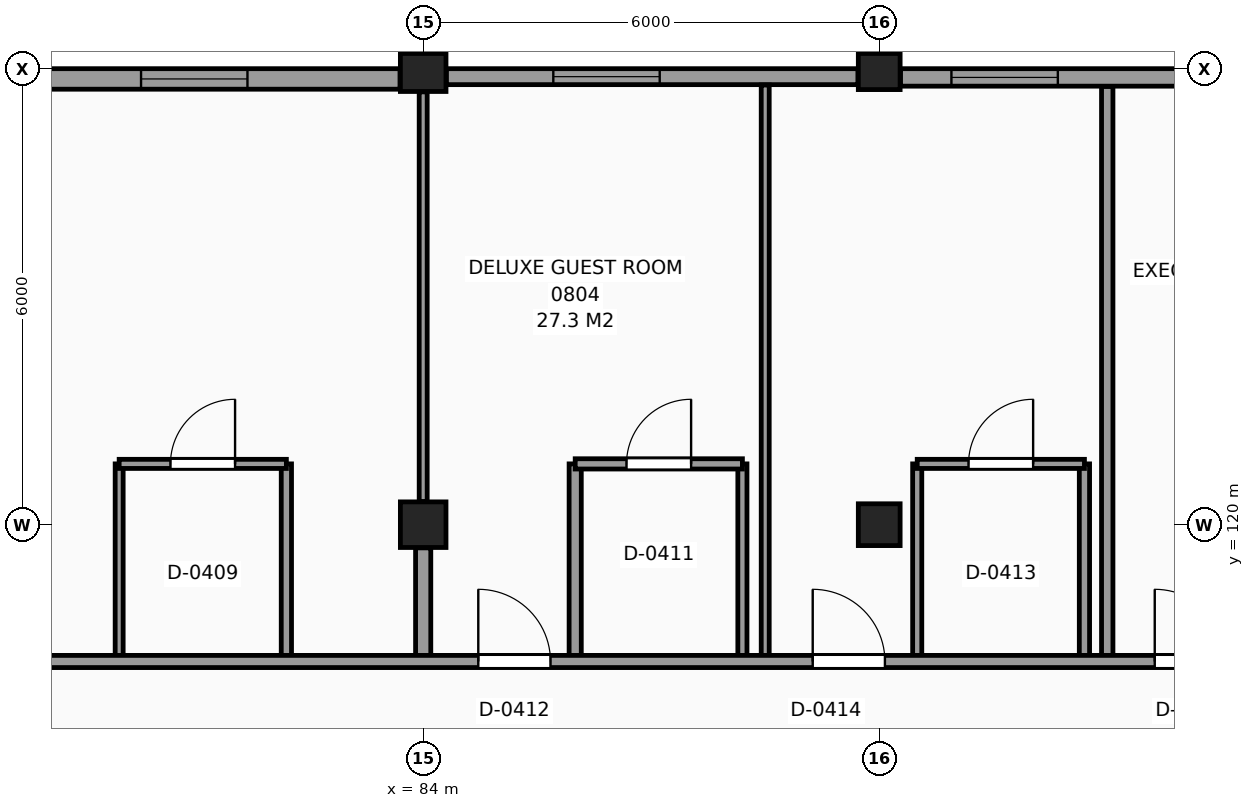
"""IFC4 building model, lengths in metres.
Left out: names, types, materials, properties, quantities, classifications, styles, units other than length and angle.
Written with IfcOpenShell. Run it as: python <this file> out.ifc"""

import sys

from ifc_helpers import new_model, si_unit, direction, frame, frame_2d, origin, origin_2d, place, context, subcontext, project, spatial, rectangle, extrude, element, fill, save


model = new_model("IFC4")
c1 = context("Model", 3, precision=1e-05, world=origin(), true_north=direction((0.0, 1.0)))
c2 = subcontext(c1, "Body", "Model", "MODEL_VIEW")
j1 = project(units=[si_unit("LENGTHUNIT", "METRE"), si_unit("PLANEANGLEUNIT", "RADIAN")], contexts=[c1])
p1 = place(None, origin())
s1 = spatial("IfcSite", under=j1, at=p1, CompositionType="ELEMENT")
p2 = place(p1, origin())
s2 = spatial("IfcBuilding", under=s1, at=p2, CompositionType="ELEMENT")
p3 = place(p2, frame((0.0, 0.0, 34.8)))
s3 = spatial("IfcBuildingStorey", under=s2, at=p3, CompositionType="ELEMENT", Elevation=34.8)
for number, where, z_axis, x_axis in (
    (1, (84.0, 120.0, 0.0), (0.0, 0.0, 1.0), (1.0, 0.0, 0.0)),
    (2, (84.0, 126.0, 0.0), (0.0, 0.0, 1.0), (1.0, 0.0, 0.0)),
):
    element("IfcColumn", number, at=place(p3, frame(where, z_axis=z_axis, x_axis=x_axis)), inside=s3, PredefinedType="COLUMN", context=c2, shape_type="SweptSolid", body=[
        extrude(rectangle(XDim=0.6, YDim=0.6, at=origin_2d()), origin(), (0.0, 0.0, 1.0), 3.3),
    ])
for number, where, z_axis, x_axis in (
    (3, (90.0, 120.0, 0.0), (0.0, 0.0, 1.0), (1.0, 0.0, 0.0)),
    (4, (90.0, 126.0, 0.0), (0.0, 0.0, 1.0), (1.0, 0.0, 0.0)),
):
    element("IfcColumn", number, at=place(p3, frame(where, z_axis=z_axis, x_axis=x_axis)), inside=s3, PredefinedType="COLUMN", context=c2, shape_type="SweptSolid", body=[
        extrude(rectangle(XDim=0.55, YDim=0.55, at=origin_2d()), origin(), (0.0, 0.0, 1.0), 3.3),
    ])
p4 = place(p3, frame((95.695, 125.885, 0.0), z_axis=(0.0, 0.0, 1.0), x_axis=(-1.0, 0.0, 0.0)))
e5 = element("IfcWall", 5, at=p4, inside=s3, PredefinedType="SOLIDWALL", context=c2, shape_type="SweptSolid", body=[
    extrude(rectangle(XDim=5.415, YDim=0.23, at=frame_2d((2.708, 0.0))), origin(), (0.0, 0.0, 1.0), 2.445),
])
p5 = place(p4, frame((3.345, 0.0, 0.8)))
e6 = element("IfcOpeningElement", 6, at=p5, cuts=e5, PredefinedType="OPENING", context=c2, shape_type="SweptSolid", body=[
    extrude(rectangle(XDim=1.4, YDim=1.4, at=frame_2d((0.7, 0.7))), frame((0.0, 0.125, 0.0), z_axis=(0.0, -1.0, 0.0), x_axis=(1.0, 0.0, 0.0)), (0.0, 0.0, 1.0), 0.25),
])
p6 = place(p3, frame((89.72, 125.895, 0.0), z_axis=(0.0, 0.0, 1.0), x_axis=(-1.0, 0.0, 0.0)))
e7 = element("IfcWall", 7, at=p6, inside=s3, PredefinedType="SOLIDWALL", context=c2, shape_type="SweptSolid", body=[
    extrude(rectangle(XDim=5.415, YDim=0.21, at=frame_2d((2.708, 0.0))), origin(), (0.0, 0.0, 1.0), 2.445),
])
p7 = place(p6, frame((2.608, 0.0, 0.8)))
e8 = element("IfcOpeningElement", 8, at=p7, cuts=e7, PredefinedType="OPENING", context=c2, shape_type="SweptSolid", body=[
    extrude(rectangle(XDim=1.4, YDim=1.4, at=frame_2d((0.7, 0.7))), frame((0.0, 0.115, 0.0), z_axis=(0.0, -1.0, 0.0), x_axis=(1.0, 0.0, 0.0)), (0.0, 0.0, 1.0), 0.23),
])
p8 = place(p3, frame((83.695, 125.865, 0.0), z_axis=(0.0, 0.0, 1.0), x_axis=(-1.0, 0.0, 0.0)))
e9 = element("IfcWall", 9, at=p8, inside=s3, PredefinedType="SOLIDWALL", context=c2, shape_type="SweptSolid", body=[
    extrude(rectangle(XDim=5.415, YDim=0.27, at=frame_2d((2.708, 0.0))), origin(), (0.0, 0.0, 1.0), 2.445),
])
p9 = place(p8, frame((2.007, 0.0, 0.8)))
e10 = element("IfcOpeningElement", 10, at=p9, cuts=e9, PredefinedType="OPENING", context=c2, shape_type="SweptSolid", body=[
    extrude(rectangle(XDim=1.4, YDim=1.4, at=frame_2d((0.7, 0.7))), frame((0.0, 0.145, 0.0), z_axis=(0.0, -1.0, 0.0), x_axis=(1.0, 0.0, 0.0)), (0.0, 0.0, 1.0), 0.29),
])
p10 = place(p3, frame((80.0, 118.2, 0.0), z_axis=(0.0, 0.0, 1.0), x_axis=(0.0, 1.0, 0.0)))
e11 = element("IfcWall", 11, at=p10, inside=s3, PredefinedType="PARTITIONING", context=c2, shape_type="SweptSolid", body=[
    extrude(rectangle(XDim=2.6, YDim=0.105, at=frame_2d((1.3, 0.0))), origin(), (0.0, 0.0, 1.0), 3.07),
])
p11 = place(p3, frame((82.2, 118.2, 0.0), z_axis=(0.0, 0.0, 1.0), x_axis=(0.0, 1.0, 0.0)))
e12 = element("IfcWall", 12, at=p11, inside=s3, PredefinedType="PARTITIONING", context=c2, shape_type="SweptSolid", body=[
    extrude(rectangle(XDim=2.6, YDim=0.135, at=frame_2d((1.3, 0.0))), origin(), (0.0, 0.0, 1.0), 3.07),
])
p12 = place(p3, frame((84.0, 118.2, 0.0), z_axis=(0.0, 0.0, 1.0), x_axis=(0.0, 1.0, 0.0)))
e13 = element("IfcWall", 13, at=p12, inside=s3, PredefinedType="PARTITIONING", context=c2, shape_type="SweptSolid", body=[
    extrude(rectangle(XDim=1.495, YDim=0.2, at=frame_2d((0.748, 0.0))), origin(), (0.0, 0.0, 1.0), 2.295),
])
p13 = place(p3, frame((84.0, 120.305, 0.0), z_axis=(0.0, 0.0, 1.0), x_axis=(0.0, 1.0, 0.0)))
e14 = element("IfcWall", 14, at=p13, inside=s3, PredefinedType="PARTITIONING", context=c2, shape_type="SweptSolid", body=[
    extrude(rectangle(XDim=5.39, YDim=0.105, at=frame_2d((2.695, 0.0))), origin(), (0.0, 0.0, 1.0), 2.295),
])
p14 = place(p3, frame((86.0, 118.2, 0.0), z_axis=(0.0, 0.0, 1.0), x_axis=(0.0, 1.0, 0.0)))
e15 = element("IfcWall", 15, at=p14, inside=s3, PredefinedType="PARTITIONING", context=c2, shape_type="SweptSolid", body=[
    extrude(rectangle(XDim=2.6, YDim=0.16, at=frame_2d((1.3, 0.0))), origin(), (0.0, 0.0, 1.0), 3.07),
])
p15 = place(p3, frame((88.2, 118.2, 0.0), z_axis=(0.0, 0.0, 1.0), x_axis=(0.0, 1.0, 0.0)))
e16 = element("IfcWall", 16, at=p15, inside=s3, PredefinedType="PARTITIONING", context=c2, shape_type="SweptSolid", body=[
    extrude(rectangle(XDim=2.6, YDim=0.12, at=frame_2d((1.3, 0.0))), origin(), (0.0, 0.0, 1.0), 3.07),
])
p16 = place(p3, frame((88.5, 118.2, 0.0), z_axis=(0.0, 0.0, 1.0), x_axis=(0.0, 1.0, 0.0)))
e17 = element("IfcWall", 17, at=p16, inside=s3, PredefinedType="PARTITIONING", context=c2, shape_type="SweptSolid", body=[
    extrude(rectangle(XDim=7.585, YDim=0.105, at=frame_2d((3.792, 0.0))), origin(), (0.0, 0.0, 1.0), 3.07),
])
p17 = place(p3, frame((90.5, 118.2, 0.0), z_axis=(0.0, 0.0, 1.0), x_axis=(0.0, 1.0, 0.0)))
e18 = element("IfcWall", 18, at=p17, inside=s3, PredefinedType="PARTITIONING", context=c2, shape_type="SweptSolid", body=[
    extrude(rectangle(XDim=2.6, YDim=0.12, at=frame_2d((1.3, 0.0))), origin(), (0.0, 0.0, 1.0), 3.07),
])
p18 = place(p3, frame((92.7, 118.2, 0.0), z_axis=(0.0, 0.0, 1.0), x_axis=(0.0, 1.0, 0.0)))
e19 = element("IfcWall", 19, at=p18, inside=s3, PredefinedType="PARTITIONING", context=c2, shape_type="SweptSolid", body=[
    extrude(rectangle(XDim=2.6, YDim=0.135, at=frame_2d((1.3, 0.0))), origin(), (0.0, 0.0, 1.0), 3.07),
])
p19 = place(p3, frame((93.0, 118.2, 0.0), z_axis=(0.0, 0.0, 1.0), x_axis=(0.0, 1.0, 0.0)))
e20 = element("IfcWall", 20, at=p19, inside=s3, PredefinedType="PARTITIONING", context=c2, shape_type="SweptSolid", body=[
    extrude(rectangle(XDim=7.565, YDim=0.15, at=frame_2d((3.782, 0.0))), origin(), (0.0, 0.0, 1.0), 3.07),
])
p20 = place(p3, frame((66.275, 118.2, 0.0), z_axis=(0.0, 0.0, 1.0), x_axis=(1.0, 0.0, 0.0)))
e21 = element("IfcWall", 21, at=p20, inside=s3, PredefinedType="PARTITIONING", context=c2, shape_type="SweptSolid", body=[
    extrude(rectangle(XDim=110.225, YDim=0.16, at=frame_2d((55.113, 0.0))), origin(), (0.0, 0.0, 1.0), 3.07),
])
p21 = place(p20, frame((0.45, 0.0, 0.0)))
e22 = element("IfcOpeningElement", 22, at=p21, cuts=e21, PredefinedType="OPENING", context=c2, shape_type="SweptSolid", body=[
    extrude(rectangle(XDim=0.95, YDim=2.1, at=frame_2d((0.475, 1.05))), frame((0.0, 0.09, 0.0), z_axis=(0.0, -1.0, 0.0), x_axis=(1.0, 0.0, 0.0)), (0.0, 0.0, 1.0), 0.18),
])
p22 = place(p20, frame((4.85, 0.0, 0.0)))
e23 = element("IfcOpeningElement", 23, at=p22, cuts=e21, PredefinedType="OPENING", context=c2, shape_type="SweptSolid", body=[
    extrude(rectangle(XDim=0.95, YDim=2.1, at=frame_2d((0.475, 1.05))), frame((0.0, 0.09, 0.0), z_axis=(0.0, -1.0, 0.0), x_axis=(1.0, 0.0, 0.0)), (0.0, 0.0, 1.0), 0.18),
])
p23 = place(p20, frame((9.35, 0.0, 0.0)))
e24 = element("IfcOpeningElement", 24, at=p23, cuts=e21, PredefinedType="OPENING", context=c2, shape_type="SweptSolid", body=[
    extrude(rectangle(XDim=0.95, YDim=2.1, at=frame_2d((0.475, 1.05))), frame((0.0, 0.09, 0.0), z_axis=(0.0, -1.0, 0.0), x_axis=(1.0, 0.0, 0.0)), (0.0, 0.0, 1.0), 0.18),
])
p24 = place(p20, frame((18.45, 0.0, 0.0)))
e25 = element("IfcOpeningElement", 25, at=p24, cuts=e21, PredefinedType="OPENING", context=c2, shape_type="SweptSolid", body=[
    extrude(rectangle(XDim=0.95, YDim=2.1, at=frame_2d((0.475, 1.05))), frame((0.0, 0.09, 0.0), z_axis=(0.0, -1.0, 0.0), x_axis=(1.0, 0.0, 0.0)), (0.0, 0.0, 1.0), 0.18),
])
p25 = place(p20, frame((22.85, 0.0, 0.0)))
e26 = element("IfcOpeningElement", 26, at=p25, cuts=e21, PredefinedType="OPENING", context=c2, shape_type="SweptSolid", body=[
    extrude(rectangle(XDim=0.95, YDim=2.1, at=frame_2d((0.475, 1.05))), frame((0.0, 0.09, 0.0), z_axis=(0.0, -1.0, 0.0), x_axis=(1.0, 0.0, 0.0)), (0.0, 0.0, 1.0), 0.18),
])
p26 = place(p20, frame((27.35, 0.0, 0.0)))
e27 = element("IfcOpeningElement", 27, at=p26, cuts=e21, PredefinedType="OPENING", context=c2, shape_type="SweptSolid", body=[
    extrude(rectangle(XDim=0.95, YDim=2.1, at=frame_2d((0.475, 1.05))), frame((0.0, 0.09, 0.0), z_axis=(0.0, -1.0, 0.0), x_axis=(1.0, 0.0, 0.0)), (0.0, 0.0, 1.0), 0.18),
])
p27 = place(p20, frame((42.05, 0.0, 0.0)))
e28 = element("IfcOpeningElement", 28, at=p27, cuts=e21, PredefinedType="OPENING", context=c2, shape_type="SweptSolid", body=[
    extrude(rectangle(XDim=0.95, YDim=2.1, at=frame_2d((0.475, 1.05))), frame((0.0, 0.09, 0.0), z_axis=(0.0, -1.0, 0.0), x_axis=(1.0, 0.0, 0.0)), (0.0, 0.0, 1.0), 0.18),
])
p28 = place(p20, frame((50.3, 0.0, 0.0)))
e29 = element("IfcOpeningElement", 29, at=p28, cuts=e21, PredefinedType="OPENING", context=c2, shape_type="SweptSolid", body=[
    extrude(rectangle(XDim=0.95, YDim=2.1, at=frame_2d((0.475, 1.05))), frame((0.0, 0.09, 0.0), z_axis=(0.0, -1.0, 0.0), x_axis=(1.0, 0.0, 0.0)), (0.0, 0.0, 1.0), 0.18),
])
p29 = place(p20, frame((52.85, 0.0, 0.0)))
e30 = element("IfcOpeningElement", 30, at=p29, cuts=e21, PredefinedType="OPENING", context=c2, shape_type="SweptSolid", body=[
    extrude(rectangle(XDim=0.95, YDim=2.1, at=frame_2d((0.475, 1.05))), frame((0.0, 0.09, 0.0), z_axis=(0.0, -1.0, 0.0), x_axis=(1.0, 0.0, 0.0)), (0.0, 0.0, 1.0), 0.18),
])
p30 = place(p20, frame((60.05, 0.0, 0.0)))
e31 = element("IfcOpeningElement", 31, at=p30, cuts=e21, PredefinedType="OPENING", context=c2, shape_type="SweptSolid", body=[
    extrude(rectangle(XDim=0.95, YDim=2.1, at=frame_2d((0.475, 1.05))), frame((0.0, 0.09, 0.0), z_axis=(0.0, -1.0, 0.0), x_axis=(1.0, 0.0, 0.0)), (0.0, 0.0, 1.0), 0.18),
])
p31 = place(p20, frame((64.25, 0.0, 0.0)))
e32 = element("IfcOpeningElement", 32, at=p31, cuts=e21, PredefinedType="OPENING", context=c2, shape_type="SweptSolid", body=[
    extrude(rectangle(XDim=0.95, YDim=2.1, at=frame_2d((0.475, 1.05))), frame((0.0, 0.09, 0.0), z_axis=(0.0, -1.0, 0.0), x_axis=(1.0, 0.0, 0.0)), (0.0, 0.0, 1.0), 0.18),
])
p32 = place(p20, frame((66.45, 0.0, 0.0)))
e33 = element("IfcOpeningElement", 33, at=p32, cuts=e21, PredefinedType="OPENING", context=c2, shape_type="SweptSolid", body=[
    extrude(rectangle(XDim=0.95, YDim=2.1, at=frame_2d((0.475, 1.05))), frame((0.0, 0.09, 0.0), z_axis=(0.0, -1.0, 0.0), x_axis=(1.0, 0.0, 0.0)), (0.0, 0.0, 1.0), 0.18),
])
p33 = place(p20, frame((72.45, 0.0, 0.0)))
e34 = element("IfcOpeningElement", 34, at=p33, cuts=e21, PredefinedType="OPENING", context=c2, shape_type="SweptSolid", body=[
    extrude(rectangle(XDim=0.95, YDim=2.1, at=frame_2d((0.475, 1.05))), frame((0.0, 0.09, 0.0), z_axis=(0.0, -1.0, 0.0), x_axis=(1.0, 0.0, 0.0)), (0.0, 0.0, 1.0), 0.18),
])
p34 = place(p20, frame((82.25, 0.0, 0.0)))
e35 = element("IfcOpeningElement", 35, at=p34, cuts=e21, PredefinedType="OPENING", context=c2, shape_type="SweptSolid", body=[
    extrude(rectangle(XDim=0.95, YDim=2.1, at=frame_2d((0.475, 1.05))), frame((0.0, 0.09, 0.0), z_axis=(0.0, -1.0, 0.0), x_axis=(1.0, 0.0, 0.0)), (0.0, 0.0, 1.0), 0.18),
])
p35 = place(p20, frame((84.45, 0.0, 0.0)))
e36 = element("IfcOpeningElement", 36, at=p35, cuts=e21, PredefinedType="OPENING", context=c2, shape_type="SweptSolid", body=[
    extrude(rectangle(XDim=0.95, YDim=2.1, at=frame_2d((0.475, 1.05))), frame((0.0, 0.09, 0.0), z_axis=(0.0, -1.0, 0.0), x_axis=(1.0, 0.0, 0.0)), (0.0, 0.0, 1.0), 0.18),
])
p36 = place(p20, frame((88.85, 0.0, 0.0)))
e37 = element("IfcOpeningElement", 37, at=p36, cuts=e21, PredefinedType="OPENING", context=c2, shape_type="SweptSolid", body=[
    extrude(rectangle(XDim=0.95, YDim=2.1, at=frame_2d((0.475, 1.05))), frame((0.0, 0.09, 0.0), z_axis=(0.0, -1.0, 0.0), x_axis=(1.0, 0.0, 0.0)), (0.0, 0.0, 1.0), 0.18),
])
p37 = place(p20, frame((96.05, 0.0, 0.0)))
e38 = element("IfcOpeningElement", 38, at=p37, cuts=e21, PredefinedType="OPENING", context=c2, shape_type="SweptSolid", body=[
    extrude(rectangle(XDim=0.95, YDim=2.1, at=frame_2d((0.475, 1.05))), frame((0.0, 0.09, 0.0), z_axis=(0.0, -1.0, 0.0), x_axis=(1.0, 0.0, 0.0)), (0.0, 0.0, 1.0), 0.18),
])
p38 = place(p20, frame((104.3, 0.0, 0.0)))
e39 = element("IfcOpeningElement", 39, at=p38, cuts=e21, PredefinedType="OPENING", context=c2, shape_type="SweptSolid", body=[
    extrude(rectangle(XDim=0.95, YDim=2.1, at=frame_2d((0.475, 1.05))), frame((0.0, 0.09, 0.0), z_axis=(0.0, -1.0, 0.0), x_axis=(1.0, 0.0, 0.0)), (0.0, 0.0, 1.0), 0.18),
])
p39 = place(p20, frame((108.45, 0.0, 0.0)))
e40 = element("IfcOpeningElement", 40, at=p39, cuts=e21, PredefinedType="OPENING", context=c2, shape_type="SweptSolid", body=[
    extrude(rectangle(XDim=0.95, YDim=2.1, at=frame_2d((0.475, 1.05))), frame((0.0, 0.09, 0.0), z_axis=(0.0, -1.0, 0.0), x_axis=(1.0, 0.0, 0.0)), (0.0, 0.0, 1.0), 0.18),
])
p40 = place(p3, frame((80.0, 120.8, 0.0), z_axis=(0.0, 0.0, 1.0), x_axis=(1.0, 0.0, 0.0)))
e41 = element("IfcWall", 41, at=p40, inside=s3, PredefinedType="PARTITIONING", context=c2, shape_type="SweptSolid", body=[
    extrude(rectangle(XDim=2.2, YDim=0.12, at=frame_2d((1.1, 0.0))), origin(), (0.0, 0.0, 1.0), 3.07),
])
p41 = place(p40, frame((0.675, 0.0, 0.0)))
e42 = element("IfcOpeningElement", 42, at=p41, cuts=e41, PredefinedType="OPENING", context=c2, shape_type="SweptSolid", body=[
    extrude(rectangle(XDim=0.85, YDim=2.1, at=frame_2d((0.425, 1.05))), frame((0.0, 0.07, 0.0), z_axis=(0.0, -1.0, 0.0), x_axis=(1.0, 0.0, 0.0)), (0.0, 0.0, 1.0), 0.14),
])
p42 = place(p3, frame((86.0, 120.8, 0.0), z_axis=(0.0, 0.0, 1.0), x_axis=(1.0, 0.0, 0.0)))
e43 = element("IfcWall", 43, at=p42, inside=s3, PredefinedType="PARTITIONING", context=c2, shape_type="SweptSolid", body=[
    extrude(rectangle(XDim=2.2, YDim=0.135, at=frame_2d((1.1, 0.0))), origin(), (0.0, 0.0, 1.0), 3.07),
])
p43 = place(p42, frame((0.675, 0.0, 0.0)))
e44 = element("IfcOpeningElement", 44, at=p43, cuts=e43, PredefinedType="OPENING", context=c2, shape_type="SweptSolid", body=[
    extrude(rectangle(XDim=0.85, YDim=2.1, at=frame_2d((0.425, 1.05))), frame((0.0, 0.078, 0.0), z_axis=(0.0, -1.0, 0.0), x_axis=(1.0, 0.0, 0.0)), (0.0, 0.0, 1.0), 0.155),
])
p44 = place(p3, frame((90.5, 120.8, 0.0), z_axis=(0.0, 0.0, 1.0), x_axis=(1.0, 0.0, 0.0)))
e45 = element("IfcWall", 45, at=p44, inside=s3, PredefinedType="PARTITIONING", context=c2, shape_type="SweptSolid", body=[
    extrude(rectangle(XDim=2.2, YDim=0.12, at=frame_2d((1.1, 0.0))), origin(), (0.0, 0.0, 1.0), 3.07),
])
p45 = place(p44, frame((0.675, 0.0, 0.0)))
e46 = element("IfcOpeningElement", 46, at=p45, cuts=e45, PredefinedType="OPENING", context=c2, shape_type="SweptSolid", body=[
    extrude(rectangle(XDim=0.85, YDim=2.1, at=frame_2d((0.425, 1.05))), frame((0.0, 0.07, 0.0), z_axis=(0.0, -1.0, 0.0), x_axis=(1.0, 0.0, 0.0)), (0.0, 0.0, 1.0), 0.14),
])
p46 = place(p9, origin())
e47 = element("IfcWindow", 47, at=p46, inside=s3, PartitioningType="SINGLE_PANEL", PredefinedType="WINDOW", context=c2, shape_type="SweptSolid", body=[
    extrude(rectangle(XDim=1.4, YDim=1.4, at=frame_2d((0.7, 0.7))), frame((0.0, 0.03, 0.0), z_axis=(0.0, -1.0, 0.0), x_axis=(1.0, 0.0, 0.0)), (0.0, 0.0, 1.0), 0.06),
])
fill(e10, e47)
p47 = place(p7, origin())
e48 = element("IfcWindow", 48, at=p47, inside=s3, PartitioningType="SINGLE_PANEL", PredefinedType="WINDOW", context=c2, shape_type="SweptSolid", body=[
    extrude(rectangle(XDim=1.4, YDim=1.4, at=frame_2d((0.7, 0.7))), frame((0.0, 0.03, 0.0), z_axis=(0.0, -1.0, 0.0), x_axis=(1.0, 0.0, 0.0)), (0.0, 0.0, 1.0), 0.06),
])
fill(e8, e48)
p48 = place(p5, origin())
e49 = element("IfcWindow", 49, at=p48, inside=s3, PartitioningType="SINGLE_PANEL", PredefinedType="WINDOW", context=c2, shape_type="SweptSolid", body=[
    extrude(rectangle(XDim=1.4, YDim=1.4, at=frame_2d((0.7, 0.7))), frame((0.0, 0.03, 0.0), z_axis=(0.0, -1.0, 0.0), x_axis=(1.0, 0.0, 0.0)), (0.0, 0.0, 1.0), 0.06),
])
fill(e6, e49)
p49 = place(p41, origin())
e50 = element("IfcDoor", 50, at=p49, inside=s3, OperationType="SINGLE_SWING_RIGHT", PredefinedType="DOOR", context=c2, shape_type="SweptSolid", body=[
    extrude(rectangle(XDim=0.85, YDim=2.1, at=frame_2d((0.425, 1.05))), frame((0.0, 0.025, 0.0), z_axis=(0.0, -1.0, 0.0), x_axis=(1.0, 0.0, 0.0)), (0.0, 0.0, 1.0), 0.05),
])
fill(e42, e50)
p50 = place(p43, origin())
e51 = element("IfcDoor", 51, at=p50, inside=s3, OperationType="SINGLE_SWING_RIGHT", PredefinedType="DOOR", context=c2, shape_type="SweptSolid", body=[
    extrude(rectangle(XDim=0.85, YDim=2.1, at=frame_2d((0.425, 1.05))), frame((0.0, 0.025, 0.0), z_axis=(0.0, -1.0, 0.0), x_axis=(1.0, 0.0, 0.0)), (0.0, 0.0, 1.0), 0.05),
])
fill(e44, e51)
p51 = place(p24, origin())
e52 = element("IfcDoor", 52, at=p51, inside=s3, OperationType="SINGLE_SWING_LEFT", PredefinedType="DOOR", context=c2, shape_type="SweptSolid", body=[
    extrude(rectangle(XDim=0.95, YDim=2.1, at=frame_2d((0.475, 1.05))), frame((0.0, 0.025, 0.0), z_axis=(0.0, -1.0, 0.0), x_axis=(1.0, 0.0, 0.0)), (0.0, 0.0, 1.0), 0.05),
])
fill(e25, e52)
p52 = place(p45, origin())
e53 = element("IfcDoor", 53, at=p52, inside=s3, OperationType="SINGLE_SWING_RIGHT", PredefinedType="DOOR", context=c2, shape_type="SweptSolid", body=[
    extrude(rectangle(XDim=0.85, YDim=2.1, at=frame_2d((0.425, 1.05))), frame((0.0, 0.025, 0.0), z_axis=(0.0, -1.0, 0.0), x_axis=(1.0, 0.0, 0.0)), (0.0, 0.0, 1.0), 0.05),
])
fill(e46, e53)
p53 = place(p25, origin())
e54 = element("IfcDoor", 54, at=p53, inside=s3, OperationType="SINGLE_SWING_LEFT", PredefinedType="DOOR", context=c2, shape_type="SweptSolid", body=[
    extrude(rectangle(XDim=0.95, YDim=2.1, at=frame_2d((0.475, 1.05))), frame((0.0, 0.025, 0.0), z_axis=(0.0, -1.0, 0.0), x_axis=(1.0, 0.0, 0.0)), (0.0, 0.0, 1.0), 0.05),
])
fill(e26, e54)
p54 = place(p26, origin())
e55 = element("IfcDoor", 55, at=p54, inside=s3, OperationType="SINGLE_SWING_LEFT", PredefinedType="DOOR", context=c2, shape_type="SweptSolid", body=[
    extrude(rectangle(XDim=0.95, YDim=2.1, at=frame_2d((0.475, 1.05))), frame((0.0, 0.025, 0.0), z_axis=(0.0, -1.0, 0.0), x_axis=(1.0, 0.0, 0.0)), (0.0, 0.0, 1.0), 0.05),
])
fill(e27, e55)
save(model, sys.argv[1])
